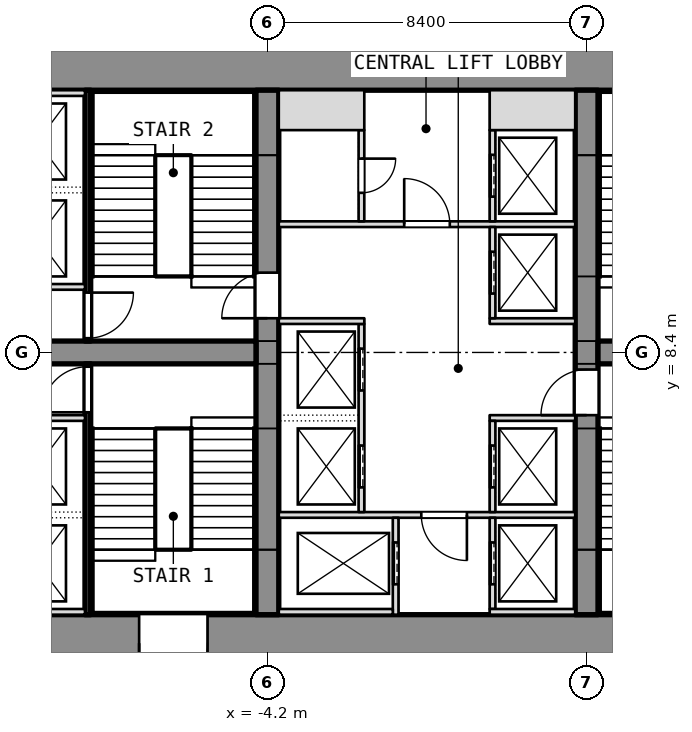
"""IFC4 building model, lengths in metres.
Left out: names, types, materials, properties, quantities, classifications, styles, units other than length and angle.
Written with IfcOpenShell. Run it as: python <this file> out.ifc"""

import sys

from ifc_helpers import new_model, si_unit, direction, frame, frame_2d, origin, place, context, subcontext, project, spatial, rectangle, extrude, element, fill, save


model = new_model("IFC4")
c1 = context("Model", 3, precision=1e-05, world=origin(), true_north=direction((0.0, 1.0)))
c2 = subcontext(c1, "Body", "Model", "MODEL_VIEW")
j1 = project(units=[si_unit("LENGTHUNIT", "METRE"), si_unit("PLANEANGLEUNIT", "RADIAN")], contexts=[c1])
p1 = place(None, origin())
s1 = spatial("IfcSite", under=j1, at=p1, CompositionType="ELEMENT")
p2 = place(p1, origin())
s2 = spatial("IfcBuilding", under=s1, at=p2, CompositionType="ELEMENT")
p3 = place(p2, origin())
s3 = spatial("IfcBuildingStorey", under=s2, at=p3, CompositionType="ELEMENT", Elevation=0.0)
p4 = place(p3, frame((-11.1, 0.75, -0.3), z_axis=(0.0, 0.0, 1.0), x_axis=(1.0, 0.0, 0.0)))
e1 = element("IfcWall", 1, at=p4, inside=s3, PredefinedType="SHEAR", context=c2, shape_type="SweptSolid", body=[
    extrude(rectangle(XDim=22.2, YDim=1.5, at=frame_2d((11.1, 0.0))), origin(), (0.0, 0.0, 1.0), 8.3),
])
p5 = place(p4, frame((3.525, 0.0, 0.3)))
e2 = element("IfcOpeningElement", 2, at=p5, cuts=e1, PredefinedType="OPENING", context=c2, shape_type="SweptSolid", body=[
    extrude(rectangle(XDim=1.8, YDim=2.1, at=frame_2d((0.9, 1.05))), frame((0.0, 0.75, 0.0), z_axis=(0.0, -1.0, 0.0), x_axis=(1.0, 0.0, 0.0)), (0.0, 0.0, 1.0), 1.5),
])
p6 = place(p4, frame((16.875, 0.0, 0.3)))
e3 = element("IfcOpeningElement", 3, at=p6, cuts=e1, PredefinedType="OPENING", context=c2, shape_type="SweptSolid", body=[
    extrude(rectangle(XDim=1.8, YDim=2.1, at=frame_2d((0.9, 1.05))), frame((0.0, 0.75, 0.0), z_axis=(0.0, -1.0, 0.0), x_axis=(1.0, 0.0, 0.0)), (0.0, 0.0, 1.0), 1.5),
])
p7 = place(p3, frame((-11.1, 16.05, -0.3), z_axis=(0.0, 0.0, 1.0), x_axis=(1.0, 0.0, 0.0)))
e4 = element("IfcWall", 4, at=p7, inside=s3, PredefinedType="SHEAR", context=c2, shape_type="SweptSolid", body=[
    extrude(rectangle(XDim=22.2, YDim=1.5, at=frame_2d((11.1, 0.0))), origin(), (0.0, 0.0, 1.0), 8.3),
])
p8 = place(p3, frame((-4.2, 1.5, -0.3), z_axis=(0.0, 0.0, 1.0), x_axis=(0.0, 1.0, 0.0)))
e5 = element("IfcWall", 5, at=p8, inside=s3, PredefinedType="SHEAR", context=c2, shape_type="SweptSolid", body=[
    extrude(rectangle(XDim=13.8, YDim=0.6, at=frame_2d((6.9, 0.0))), origin(), (0.0, 0.0, 1.0), 8.3),
])
p9 = place(p8, frame((7.8, 0.0, 0.3)))
e6 = element("IfcOpeningElement", 6, at=p9, cuts=e5, PredefinedType="OPENING", context=c2, shape_type="SweptSolid", body=[
    extrude(rectangle(XDim=1.2, YDim=2.1, at=frame_2d((0.6, 1.05))), frame((0.0, 0.3, 0.0), z_axis=(0.0, -1.0, 0.0), x_axis=(1.0, 0.0, 0.0)), (0.0, 0.0, 1.0), 0.6),
])
p10 = place(p3, frame((4.2, 1.5, -0.3), z_axis=(0.0, 0.0, 1.0), x_axis=(0.0, 1.0, 0.0)))
e7 = element("IfcWall", 7, at=p10, inside=s3, PredefinedType="SHEAR", context=c2, shape_type="SweptSolid", body=[
    extrude(rectangle(XDim=13.8, YDim=0.6, at=frame_2d((6.9, 0.0))), origin(), (0.0, 0.0, 1.0), 8.3),
])
p11 = place(p10, frame((5.25, 0.0, 0.3)))
e8 = element("IfcOpeningElement", 8, at=p11, cuts=e7, PredefinedType="OPENING", context=c2, shape_type="SweptSolid", body=[
    extrude(rectangle(XDim=1.2, YDim=2.1, at=frame_2d((0.6, 1.05))), frame((0.0, 0.3, 0.0), z_axis=(0.0, -1.0, 0.0), x_axis=(1.0, 0.0, 0.0)), (0.0, 0.0, 1.0), 0.6),
])
for number, where, z_axis, x_axis in (
    (9, (-11.1, 8.4, -0.3), (0.0, 0.0, 1.0), (1.0, 0.0, 0.0)),
    (10, (4.5, 8.4, -0.3), (0.0, 0.0, 1.0), (1.0, 0.0, 0.0)),
):
    element("IfcWall", number, at=place(p3, frame(where, z_axis=z_axis, x_axis=x_axis)), inside=s3, PredefinedType="SHEAR", context=c2, shape_type="SweptSolid", body=[
        extrude(rectangle(XDim=6.6, YDim=0.6, at=frame_2d((3.3, 0.0))), origin(), (0.0, 0.0, 1.0), 8.3),
    ])
p12 = place(p3, frame((-8.925, 1.5, 0.0), z_axis=(0.0, 0.0, 1.0), x_axis=(0.0, 1.0, 0.0)))
e11 = element("IfcWall", 11, at=p12, inside=s3, PredefinedType="SHEAR", context=c2, shape_type="SweptSolid", body=[
    extrude(rectangle(XDim=6.6, YDim=0.15, at=frame_2d((3.3, 0.0))), origin(), (0.0, 0.0, 1.0), 7.78),
])
p13 = place(p12, frame((5.325, 0.0, 0.0)))
e12 = element("IfcOpeningElement", 12, at=p13, cuts=e11, PredefinedType="OPENING", context=c2, shape_type="SweptSolid", body=[
    extrude(rectangle(XDim=1.2, YDim=2.1, at=frame_2d((0.6, 1.05))), frame((0.0, 0.075, 0.0), z_axis=(0.0, -1.0, 0.0), x_axis=(1.0, 0.0, 0.0)), (0.0, 0.0, 1.0), 0.15),
])
for number, where, z_axis, x_axis in (
    (13, (-11.1, 6.675, -0.3), (0.0, 0.0, 1.0), (1.0, 0.0, 0.0)),
    (14, (-11.1, 1.575, -0.3), (0.0, 0.0, 1.0), (1.0, 0.0, 0.0)),
):
    element("IfcWall", number, at=place(p3, frame(where, z_axis=z_axis, x_axis=x_axis)), inside=s3, PredefinedType="SHEAR", context=c2, shape_type="SweptSolid", body=[
        extrude(rectangle(XDim=2.1, YDim=0.15, at=frame_2d((1.05, 0.0))), origin(), (0.0, 0.0, 1.0), 8.3),
    ])
p14 = place(p3, frame((-8.925, 8.7, 0.0), z_axis=(0.0, 0.0, 1.0), x_axis=(0.0, 1.0, 0.0)))
e15 = element("IfcWall", 15, at=p14, inside=s3, PredefinedType="SHEAR", context=c2, shape_type="SweptSolid", body=[
    extrude(rectangle(XDim=6.6, YDim=0.15, at=frame_2d((3.3, 0.0))), origin(), (0.0, 0.0, 1.0), 7.78),
])
p15 = place(p14, frame((0.075, 0.0, 0.0)))
e16 = element("IfcOpeningElement", 16, at=p15, cuts=e15, PredefinedType="OPENING", context=c2, shape_type="SweptSolid", body=[
    extrude(rectangle(XDim=1.2, YDim=2.1, at=frame_2d((0.6, 1.05))), frame((0.0, 0.075, 0.0), z_axis=(0.0, -1.0, 0.0), x_axis=(1.0, 0.0, 0.0)), (0.0, 0.0, 1.0), 0.15),
])
for number, where, z_axis, x_axis in (
    (17, (-11.1, 10.125, -0.3), (0.0, 0.0, 1.0), (1.0, 0.0, 0.0)),
    (18, (-11.1, 15.225, -0.3), (0.0, 0.0, 1.0), (1.0, 0.0, 0.0)),
):
    element("IfcWall", number, at=place(p3, frame(where, z_axis=z_axis, x_axis=x_axis)), inside=s3, PredefinedType="SHEAR", context=c2, shape_type="SweptSolid", body=[
        extrude(rectangle(XDim=2.1, YDim=0.15, at=frame_2d((1.05, 0.0))), origin(), (0.0, 0.0, 1.0), 8.3),
    ])
p16 = place(p3, frame((-3.9, 4.125, 0.0), z_axis=(0.0, 0.0, 1.0), x_axis=(1.0, 0.0, 0.0)))
e19 = element("IfcWall", 19, at=p16, inside=s3, PredefinedType="PARTITIONING", context=c2, shape_type="SweptSolid", body=[
    extrude(rectangle(XDim=7.8, YDim=0.15, at=frame_2d((3.9, 0.0))), origin(), (0.0, 0.0, 1.0), 7.78),
])
p17 = place(p16, frame((3.75, 0.0, 0.0)))
e20 = element("IfcOpeningElement", 20, at=p17, cuts=e19, PredefinedType="OPENING", context=c2, shape_type="SweptSolid", body=[
    extrude(rectangle(XDim=1.2, YDim=2.1, at=frame_2d((0.6, 1.05))), frame((0.0, 0.075, 0.0), z_axis=(0.0, -1.0, 0.0), x_axis=(1.0, 0.0, 0.0)), (0.0, 0.0, 1.0), 0.15),
])
p18 = place(p3, frame((-3.9, 11.775, 0.0), z_axis=(0.0, 0.0, 1.0), x_axis=(1.0, 0.0, 0.0)))
e21 = element("IfcWall", 21, at=p18, inside=s3, PredefinedType="PARTITIONING", context=c2, shape_type="SweptSolid", body=[
    extrude(rectangle(XDim=7.8, YDim=0.15, at=frame_2d((3.9, 0.0))), origin(), (0.0, 0.0, 1.0), 7.78),
])
p19 = place(p18, frame((3.3, 0.0, 0.0)))
e22 = element("IfcOpeningElement", 22, at=p19, cuts=e21, PredefinedType="OPENING", context=c2, shape_type="SweptSolid", body=[
    extrude(rectangle(XDim=1.2, YDim=2.1, at=frame_2d((0.6, 1.05))), frame((0.0, 0.075, 0.0), z_axis=(0.0, -1.0, 0.0), x_axis=(1.0, 0.0, 0.0)), (0.0, 0.0, 1.0), 0.15),
])
p20 = place(p3, frame((-0.825, 1.5, -0.3), z_axis=(0.0, 0.0, 1.0), x_axis=(0.0, 1.0, 0.0)))
e23 = element("IfcWall", 23, at=p20, inside=s3, PredefinedType="SHEAR", context=c2, shape_type="SweptSolid", body=[
    extrude(rectangle(XDim=2.55, YDim=0.15, at=frame_2d((1.275, 0.0))), origin(), (0.0, 0.0, 1.0), 8.3),
])
p21 = place(p20, frame((0.8, 0.0, 0.3)))
e24 = element("IfcOpeningElement", 24, at=p21, cuts=e23, PredefinedType="OPENING", context=c2, shape_type="SweptSolid", body=[
    extrude(rectangle(XDim=1.1, YDim=2.1, at=frame_2d((0.55, 1.05))), frame((0.0, 0.075, 0.0), z_axis=(0.0, -1.0, 0.0), x_axis=(1.0, 0.0, 0.0)), (0.0, 0.0, 1.0), 0.15),
])
p22 = place(p3, frame((-3.9, 1.575, -0.3), z_axis=(0.0, 0.0, 1.0), x_axis=(1.0, 0.0, 0.0)))
e25 = element("IfcWall", 25, at=p22, inside=s3, PredefinedType="SHEAR", context=c2, shape_type="SweptSolid", body=[
    extrude(rectangle(XDim=3.0, YDim=0.15, at=frame_2d((1.5, 0.0))), origin(), (0.0, 0.0, 1.0), 8.3),
])
p23 = place(p3, frame((-1.725, 4.2, -0.3), z_axis=(0.0, 0.0, 1.0), x_axis=(0.0, 1.0, 0.0)))
e26 = element("IfcWall", 26, at=p23, inside=s3, PredefinedType="SHEAR", context=c2, shape_type="SweptSolid", body=[
    extrude(rectangle(XDim=4.95, YDim=0.15, at=frame_2d((2.475, 0.0))), origin(), (0.0, 0.0, 1.0), 8.3),
])
p24 = place(p23, frame((0.65, 0.0, 0.3)))
e27 = element("IfcOpeningElement", 27, at=p24, cuts=e26, PredefinedType="OPENING", context=c2, shape_type="SweptSolid", body=[
    extrude(rectangle(XDim=1.1, YDim=2.1, at=frame_2d((0.55, 1.05))), frame((0.0, 0.075, 0.0), z_axis=(0.0, -1.0, 0.0), x_axis=(1.0, 0.0, 0.0)), (0.0, 0.0, 1.0), 0.15),
])
p25 = place(p23, frame((3.2, 0.0, 0.3)))
e28 = element("IfcOpeningElement", 28, at=p25, cuts=e26, PredefinedType="OPENING", context=c2, shape_type="SweptSolid", body=[
    extrude(rectangle(XDim=1.1, YDim=2.1, at=frame_2d((0.55, 1.05))), frame((0.0, 0.075, 0.0), z_axis=(0.0, -1.0, 0.0), x_axis=(1.0, 0.0, 0.0)), (0.0, 0.0, 1.0), 0.15),
])
p26 = place(p3, frame((-3.9, 9.225, -0.3), z_axis=(0.0, 0.0, 1.0), x_axis=(1.0, 0.0, 0.0)))
e29 = element("IfcWall", 29, at=p26, inside=s3, PredefinedType="SHEAR", context=c2, shape_type="SweptSolid", body=[
    extrude(rectangle(XDim=2.25, YDim=0.15, at=frame_2d((1.125, 0.0))), origin(), (0.0, 0.0, 1.0), 8.3),
])
p27 = place(p3, frame((-1.725, 11.85, 0.0), z_axis=(0.0, 0.0, 1.0), x_axis=(0.0, 1.0, 0.0)))
e30 = element("IfcWall", 30, at=p27, inside=s3, PredefinedType="PARTITIONING", context=c2, shape_type="SweptSolid", body=[
    extrude(rectangle(XDim=2.4, YDim=0.15, at=frame_2d((1.2, 0.0))), origin(), (0.0, 0.0, 1.0), 7.78),
])
p28 = place(p27, frame((0.75, 0.0, 0.0)))
e31 = element("IfcOpeningElement", 31, at=p28, cuts=e30, PredefinedType="OPENING", context=c2, shape_type="SweptSolid", body=[
    extrude(rectangle(XDim=0.9, YDim=2.1, at=frame_2d((0.45, 1.05))), frame((0.0, 0.075, 0.0), z_axis=(0.0, -1.0, 0.0), x_axis=(1.0, 0.0, 0.0)), (0.0, 0.0, 1.0), 0.15),
])
p29 = place(p3, frame((-3.9, 14.775, 0.0), z_axis=(0.0, 0.0, 1.0), x_axis=(1.0, 0.0, 0.0)))
e32 = element("IfcWall", 32, at=p29, inside=s3, PredefinedType="PARTITIONING", context=c2, shape_type="SweptSolid", body=[
    extrude(rectangle(XDim=2.25, YDim=1.05, at=frame_2d((1.125, 0.0))), origin(), (0.0, 0.0, 1.0), 7.78),
])
p30 = place(p3, frame((1.725, 1.65, -0.3), z_axis=(0.0, 0.0, 1.0), x_axis=(0.0, 1.0, 0.0)))
e33 = element("IfcWall", 33, at=p30, inside=s3, PredefinedType="SHEAR", context=c2, shape_type="SweptSolid", body=[
    extrude(rectangle(XDim=2.4, YDim=0.15, at=frame_2d((1.2, 0.0))), origin(), (0.0, 0.0, 1.0), 8.3),
])
p31 = place(p30, frame((0.65, 0.0, 0.3)))
e34 = element("IfcOpeningElement", 34, at=p31, cuts=e33, PredefinedType="OPENING", context=c2, shape_type="SweptSolid", body=[
    extrude(rectangle(XDim=1.1, YDim=2.1, at=frame_2d((0.55, 1.05))), frame((0.0, 0.075, 0.0), z_axis=(0.0, -1.0, 0.0), x_axis=(1.0, 0.0, 0.0)), (0.0, 0.0, 1.0), 0.15),
])
p32 = place(p3, frame((1.65, 1.575, -0.3), z_axis=(0.0, 0.0, 1.0), x_axis=(1.0, 0.0, 0.0)))
e35 = element("IfcWall", 35, at=p32, inside=s3, PredefinedType="SHEAR", context=c2, shape_type="SweptSolid", body=[
    extrude(rectangle(XDim=2.25, YDim=0.15, at=frame_2d((1.125, 0.0))), origin(), (0.0, 0.0, 1.0), 8.3),
])
p33 = place(p3, frame((1.725, 11.85, -0.3), z_axis=(0.0, 0.0, 1.0), x_axis=(0.0, 1.0, 0.0)))
e36 = element("IfcWall", 36, at=p33, inside=s3, PredefinedType="SHEAR", context=c2, shape_type="SweptSolid", body=[
    extrude(rectangle(XDim=2.4, YDim=0.15, at=frame_2d((1.2, 0.0))), origin(), (0.0, 0.0, 1.0), 8.3),
])
p34 = place(p33, frame((0.65, 0.0, 0.3)))
e37 = element("IfcOpeningElement", 37, at=p34, cuts=e36, PredefinedType="OPENING", context=c2, shape_type="SweptSolid", body=[
    extrude(rectangle(XDim=1.1, YDim=2.1, at=frame_2d((0.55, 1.05))), frame((0.0, 0.075, 0.0), z_axis=(0.0, -1.0, 0.0), x_axis=(1.0, 0.0, 0.0)), (0.0, 0.0, 1.0), 0.15),
])
p35 = place(p3, frame((1.65, 14.775, -0.3), z_axis=(0.0, 0.0, 1.0), x_axis=(1.0, 0.0, 0.0)))
e38 = element("IfcWall", 38, at=p35, inside=s3, PredefinedType="SHEAR", context=c2, shape_type="SweptSolid", body=[
    extrude(rectangle(XDim=2.25, YDim=1.05, at=frame_2d((1.125, 0.0))), origin(), (0.0, 0.0, 1.0), 8.3),
])
for number, where, z_axis, x_axis in (
    (39, (1.65, 6.675, -0.3), (0.0, 0.0, 1.0), (1.0, 0.0, 0.0)),
    (40, (1.65, 9.225, -0.3), (0.0, 0.0, 1.0), (1.0, 0.0, 0.0)),
):
    element("IfcWall", number, at=place(p3, frame(where, z_axis=z_axis, x_axis=x_axis)), inside=s3, PredefinedType="SHEAR", context=c2, shape_type="SweptSolid", body=[
        extrude(rectangle(XDim=2.25, YDim=0.15, at=frame_2d((1.125, 0.0))), origin(), (0.0, 0.0, 1.0), 8.3),
    ])
p36 = place(p3, frame((1.725, 4.2, -0.3), z_axis=(0.0, 0.0, 1.0), x_axis=(0.0, 1.0, 0.0)))
e41 = element("IfcWall", 41, at=p36, inside=s3, PredefinedType="SHEAR", context=c2, shape_type="SweptSolid", body=[
    extrude(rectangle(XDim=2.4, YDim=0.15, at=frame_2d((1.2, 0.0))), origin(), (0.0, 0.0, 1.0), 8.3),
])
p37 = place(p36, frame((0.65, 0.0, 0.3)))
e42 = element("IfcOpeningElement", 42, at=p37, cuts=e41, PredefinedType="OPENING", context=c2, shape_type="SweptSolid", body=[
    extrude(rectangle(XDim=1.1, YDim=2.1, at=frame_2d((0.55, 1.05))), frame((0.0, 0.075, 0.0), z_axis=(0.0, -1.0, 0.0), x_axis=(1.0, 0.0, 0.0)), (0.0, 0.0, 1.0), 0.15),
])
p38 = place(p3, frame((1.725, 9.3, -0.3), z_axis=(0.0, 0.0, 1.0), x_axis=(0.0, 1.0, 0.0)))
e43 = element("IfcWall", 43, at=p38, inside=s3, PredefinedType="SHEAR", context=c2, shape_type="SweptSolid", body=[
    extrude(rectangle(XDim=2.4, YDim=0.15, at=frame_2d((1.2, 0.0))), origin(), (0.0, 0.0, 1.0), 8.3),
])
p39 = place(p38, frame((0.65, 0.0, 0.3)))
e44 = element("IfcOpeningElement", 44, at=p39, cuts=e43, PredefinedType="OPENING", context=c2, shape_type="SweptSolid", body=[
    extrude(rectangle(XDim=1.1, YDim=2.1, at=frame_2d((0.55, 1.05))), frame((0.0, 0.075, 0.0), z_axis=(0.0, -1.0, 0.0), x_axis=(1.0, 0.0, 0.0)), (0.0, 0.0, 1.0), 0.15),
])
p40 = place(p13, origin())
e45 = element("IfcDoor", 45, at=p40, inside=s3, OperationType="SINGLE_SWING_LEFT", PredefinedType="DOOR", context=c2, shape_type="SweptSolid", body=[
    extrude(rectangle(XDim=1.2, YDim=2.1, at=frame_2d((0.6, 1.05))), frame((0.0, 0.025, 0.0), z_axis=(0.0, -1.0, 0.0), x_axis=(1.0, 0.0, 0.0)), (0.0, 0.0, 1.0), 0.05),
])
fill(e12, e45)
p41 = place(p15, origin())
e46 = element("IfcDoor", 46, at=p41, inside=s3, OperationType="SINGLE_SWING_LEFT", PredefinedType="DOOR", context=c2, shape_type="SweptSolid", body=[
    extrude(rectangle(XDim=1.2, YDim=2.1, at=frame_2d((0.6, 1.05))), frame((0.0, 0.025, 0.0), z_axis=(0.0, -1.0, 0.0), x_axis=(1.0, 0.0, 0.0)), (0.0, 0.0, 1.0), 0.05),
])
fill(e16, e46)
p42 = place(p21, origin())
e47 = element("IfcDoor", 47, at=p42, inside=s3, OperationType="SLIDING_TO_LEFT", PredefinedType="DOOR", context=c2, shape_type="SweptSolid", body=[
    extrude(rectangle(XDim=1.1, YDim=2.1, at=frame_2d((0.55, 1.05))), frame((0.0, 0.025, 0.0), z_axis=(0.0, -1.0, 0.0), x_axis=(1.0, 0.0, 0.0)), (0.0, 0.0, 1.0), 0.05),
])
fill(e24, e47)
p43 = place(p24, origin())
e48 = element("IfcDoor", 48, at=p43, inside=s3, OperationType="SLIDING_TO_LEFT", PredefinedType="DOOR", context=c2, shape_type="SweptSolid", body=[
    extrude(rectangle(XDim=1.1, YDim=2.1, at=frame_2d((0.55, 1.05))), frame((0.0, 0.025, 0.0), z_axis=(0.0, -1.0, 0.0), x_axis=(1.0, 0.0, 0.0)), (0.0, 0.0, 1.0), 0.05),
])
fill(e27, e48)
p44 = place(p25, origin())
e49 = element("IfcDoor", 49, at=p44, inside=s3, OperationType="SLIDING_TO_LEFT", PredefinedType="DOOR", context=c2, shape_type="SweptSolid", body=[
    extrude(rectangle(XDim=1.1, YDim=2.1, at=frame_2d((0.55, 1.05))), frame((0.0, 0.025, 0.0), z_axis=(0.0, -1.0, 0.0), x_axis=(1.0, 0.0, 0.0)), (0.0, 0.0, 1.0), 0.05),
])
fill(e28, e49)
p45 = place(p31, origin())
e50 = element("IfcDoor", 50, at=p45, inside=s3, OperationType="SLIDING_TO_LEFT", PredefinedType="DOOR", context=c2, shape_type="SweptSolid", body=[
    extrude(rectangle(XDim=1.1, YDim=2.1, at=frame_2d((0.55, 1.05))), frame((0.0, 0.025, 0.0), z_axis=(0.0, -1.0, 0.0), x_axis=(1.0, 0.0, 0.0)), (0.0, 0.0, 1.0), 0.05),
])
fill(e34, e50)
p46 = place(p37, origin())
e51 = element("IfcDoor", 51, at=p46, inside=s3, OperationType="SLIDING_TO_LEFT", PredefinedType="DOOR", context=c2, shape_type="SweptSolid", body=[
    extrude(rectangle(XDim=1.1, YDim=2.1, at=frame_2d((0.55, 1.05))), frame((0.0, 0.025, 0.0), z_axis=(0.0, -1.0, 0.0), x_axis=(1.0, 0.0, 0.0)), (0.0, 0.0, 1.0), 0.05),
])
fill(e42, e51)
p47 = place(p39, origin())
e52 = element("IfcDoor", 52, at=p47, inside=s3, OperationType="SLIDING_TO_LEFT", PredefinedType="DOOR", context=c2, shape_type="SweptSolid", body=[
    extrude(rectangle(XDim=1.1, YDim=2.1, at=frame_2d((0.55, 1.05))), frame((0.0, 0.025, 0.0), z_axis=(0.0, -1.0, 0.0), x_axis=(1.0, 0.0, 0.0)), (0.0, 0.0, 1.0), 0.05),
])
fill(e44, e52)
p48 = place(p34, origin())
e53 = element("IfcDoor", 53, at=p48, inside=s3, OperationType="SLIDING_TO_LEFT", PredefinedType="DOOR", context=c2, shape_type="SweptSolid", body=[
    extrude(rectangle(XDim=1.1, YDim=2.1, at=frame_2d((0.55, 1.05))), frame((0.0, 0.025, 0.0), z_axis=(0.0, -1.0, 0.0), x_axis=(1.0, 0.0, 0.0)), (0.0, 0.0, 1.0), 0.05),
])
fill(e37, e53)
p49 = place(p17, origin())
e54 = element("IfcDoor", 54, at=p49, inside=s3, OperationType="SINGLE_SWING_LEFT", PredefinedType="DOOR", context=c2, shape_type="SweptSolid", body=[
    extrude(rectangle(XDim=1.2, YDim=2.1, at=frame_2d((0.6, 1.05))), frame((0.0, 0.025, 0.0), z_axis=(0.0, -1.0, 0.0), x_axis=(1.0, 0.0, 0.0)), (0.0, 0.0, 1.0), 0.05),
])
fill(e20, e54)
p50 = place(p19, origin())
e55 = element("IfcDoor", 55, at=p50, inside=s3, OperationType="SINGLE_SWING_LEFT", PredefinedType="DOOR", context=c2, shape_type="SweptSolid", body=[
    extrude(rectangle(XDim=1.2, YDim=2.1, at=frame_2d((0.6, 1.05))), frame((0.0, 0.025, 0.0), z_axis=(0.0, -1.0, 0.0), x_axis=(1.0, 0.0, 0.0)), (0.0, 0.0, 1.0), 0.05),
])
fill(e22, e55)
p51 = place(p28, origin())
e56 = element("IfcDoor", 56, at=p51, inside=s3, OperationType="SINGLE_SWING_LEFT", PredefinedType="DOOR", context=c2, shape_type="SweptSolid", body=[
    extrude(rectangle(XDim=0.9, YDim=2.1, at=frame_2d((0.45, 1.05))), frame((0.0, 0.025, 0.0), z_axis=(0.0, -1.0, 0.0), x_axis=(1.0, 0.0, 0.0)), (0.0, 0.0, 1.0), 0.05),
])
fill(e31, e56)
p52 = place(p9, origin())
e57 = element("IfcDoor", 57, at=p52, inside=s3, OperationType="SINGLE_SWING_LEFT", PredefinedType="DOOR", context=c2, shape_type="SweptSolid", body=[
    extrude(rectangle(XDim=1.2, YDim=2.1, at=frame_2d((0.6, 1.05))), frame((0.0, 0.025, 0.0), z_axis=(0.0, -1.0, 0.0), x_axis=(1.0, 0.0, 0.0)), (0.0, 0.0, 1.0), 0.05),
])
fill(e6, e57)
p53 = place(p11, origin())
e58 = element("IfcDoor", 58, at=p53, inside=s3, OperationType="SINGLE_SWING_LEFT", PredefinedType="DOOR", context=c2, shape_type="SweptSolid", body=[
    extrude(rectangle(XDim=1.2, YDim=2.1, at=frame_2d((0.6, 1.05))), frame((0.0, 0.025, 0.0), z_axis=(0.0, -1.0, 0.0), x_axis=(1.0, 0.0, 0.0)), (0.0, 0.0, 1.0), 0.05),
])
fill(e8, e58)
p54 = place(p5, frame((1.8, 0.0, 0.0), z_axis=(0.0, 0.0, 1.0), x_axis=(-1.0, 0.0, 0.0)))
e59 = element("IfcDoor", 59, at=p54, inside=s3, OperationType="DOUBLE_DOOR_SINGLE_SWING", PredefinedType="DOOR", context=c2, shape_type="SweptSolid", body=[
    extrude(rectangle(XDim=1.8, YDim=2.1, at=frame_2d((0.9, 1.05))), frame((0.0, 0.025, 0.0), z_axis=(0.0, -1.0, 0.0), x_axis=(1.0, 0.0, 0.0)), (0.0, 0.0, 1.0), 0.05),
])
fill(e2, e59)
save(model, sys.argv[1])
